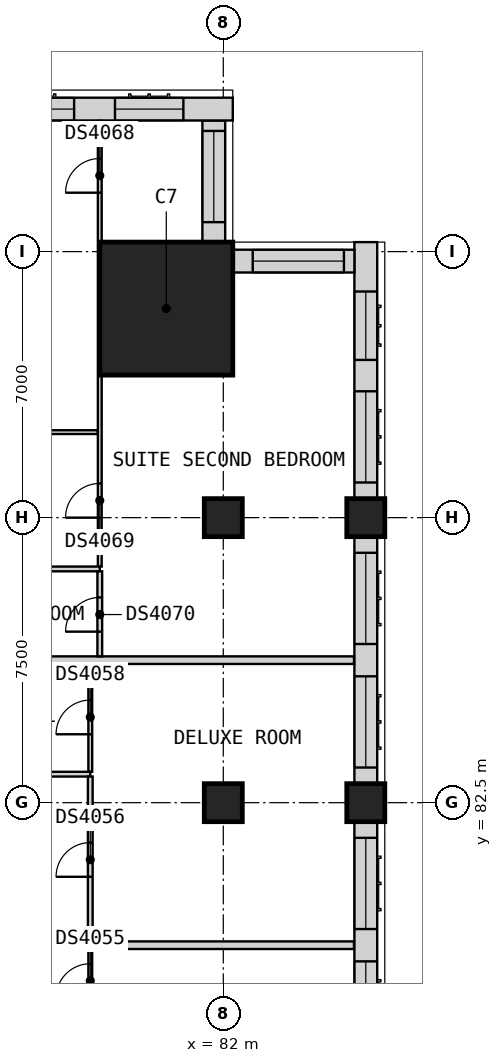
"""IFC4 building model, lengths in metres.
Left out: names, types, materials, properties, quantities, classifications, styles, units other than length and angle.
Written with IfcOpenShell. Run it as: python <this file> out.ifc"""

import sys

from ifc_helpers import new_model, si_unit, direction, frame, frame_2d, origin, origin_2d, place, context, subcontext, project, spatial, rectangle, extrude, element, fill, save


model = new_model("IFC4")
c1 = context("Model", 3, precision=1e-05, world=origin(), true_north=direction((0.0, 1.0)))
c2 = subcontext(c1, "Body", "Model", "MODEL_VIEW")
j1 = project(units=[si_unit("LENGTHUNIT", "METRE"), si_unit("PLANEANGLEUNIT", "RADIAN")], contexts=[c1])
p1 = place(None, origin())
s1 = spatial("IfcSite", under=j1, at=p1, CompositionType="ELEMENT")
p2 = place(p1, origin())
s2 = spatial("IfcBuilding", under=s1, at=p2, CompositionType="ELEMENT")
p3 = place(p2, frame((0.0, 0.0, 141.0)))
s3 = spatial("IfcBuildingStorey", under=s2, at=p3, CompositionType="ELEMENT", Elevation=141.0)
for number, where, z_axis, x_axis in (
    (1, (85.75, 82.5, 0.0), (0.0, 0.0, 1.0), (1.0, 0.0, 0.0)),
    (2, (85.75, 90.0, 0.0), (0.0, 0.0, 1.0), (1.0, 0.0, 0.0)),
    (3, (82.0, 82.5, 0.0), (0.0, 0.0, 1.0), (1.0, 0.0, 0.0)),
    (4, (82.0, 90.0, 0.0), (0.0, 0.0, 1.0), (1.0, 0.0, 0.0)),
):
    element("IfcColumn", number, at=place(p3, frame(where, z_axis=z_axis, x_axis=x_axis)), inside=s3, PredefinedType="COLUMN", context=c2, shape_type="SweptSolid", body=[
        extrude(rectangle(XDim=1.0, YDim=1.0, at=origin_2d()), origin(), (0.0, 0.0, 1.0), 3.6),
    ])
p4 = place(p3, frame((80.5, 95.5, 0.0), z_axis=(0.0, 0.0, 1.0), x_axis=(1.0, 0.0, 0.0)))
e5 = element("IfcColumn", 5, at=p4, inside=s3, PredefinedType="COLUMN", context=c2, shape_type="SweptSolid", body=[
    extrude(rectangle(XDim=3.5, YDim=3.5, at=origin_2d()), origin(), (0.0, 0.0, 1.0), 3.6),
])
p5 = place(p3, frame((85.75, 75.5, 0.0), z_axis=(0.0, 0.0, 1.0), x_axis=(0.0, 1.0, 0.0)))
e6 = element("IfcWall", 6, at=p5, inside=s3, PredefinedType="SOLIDWALL", context=c2, shape_type="SweptSolid", body=[
    extrude(rectangle(XDim=6.5, YDim=0.6, at=frame_2d((3.25, 0.0))), origin(), (0.0, 0.0, 1.0), 2.85),
])
p6 = place(p5, frame((0.425, 0.0, 0.8)))
e7 = element("IfcOpeningElement", 7, at=p6, cuts=e6, PredefinedType="OPENING", context=c2, shape_type="SweptSolid", body=[
    extrude(rectangle(XDim=2.4, YDim=1.8, at=frame_2d((1.2, 0.9))), frame((0.0, 0.31, 0.0), z_axis=(0.0, -1.0, 0.0), x_axis=(1.0, 0.0, 0.0)), (0.0, 0.0, 1.0), 0.62),
])
p7 = place(p5, frame((3.675, 0.0, 0.8)))
e8 = element("IfcOpeningElement", 8, at=p7, cuts=e6, PredefinedType="OPENING", context=c2, shape_type="SweptSolid", body=[
    extrude(rectangle(XDim=2.4, YDim=1.8, at=frame_2d((1.2, 0.9))), frame((0.0, 0.31, 0.0), z_axis=(0.0, -1.0, 0.0), x_axis=(1.0, 0.0, 0.0)), (0.0, 0.0, 1.0), 0.62),
])
p8 = place(p3, frame((85.75, 83.0, 0.0), z_axis=(0.0, 0.0, 1.0), x_axis=(0.0, 1.0, 0.0)))
e9 = element("IfcWall", 9, at=p8, inside=s3, PredefinedType="SOLIDWALL", context=c2, shape_type="SweptSolid", body=[
    extrude(rectangle(XDim=6.5, YDim=0.6, at=frame_2d((3.25, 0.0))), origin(), (0.0, 0.0, 1.0), 2.85),
])
p9 = place(p8, frame((0.425, 0.0, 0.8)))
e10 = element("IfcOpeningElement", 10, at=p9, cuts=e9, PredefinedType="OPENING", context=c2, shape_type="SweptSolid", body=[
    extrude(rectangle(XDim=2.4, YDim=1.8, at=frame_2d((1.2, 0.9))), frame((0.0, 0.31, 0.0), z_axis=(0.0, -1.0, 0.0), x_axis=(1.0, 0.0, 0.0)), (0.0, 0.0, 1.0), 0.62),
])
p10 = place(p8, frame((3.675, 0.0, 0.8)))
e11 = element("IfcOpeningElement", 11, at=p10, cuts=e9, PredefinedType="OPENING", context=c2, shape_type="SweptSolid", body=[
    extrude(rectangle(XDim=2.4, YDim=1.8, at=frame_2d((1.2, 0.9))), frame((0.0, 0.31, 0.0), z_axis=(0.0, -1.0, 0.0), x_axis=(1.0, 0.0, 0.0)), (0.0, 0.0, 1.0), 0.62),
])
p11 = place(p3, frame((85.75, 90.5, 0.0), z_axis=(0.0, 0.0, 1.0), x_axis=(0.0, 1.0, 0.0)))
e12 = element("IfcWall", 12, at=p11, inside=s3, PredefinedType="SOLIDWALL", context=c2, shape_type="SweptSolid", body=[
    extrude(rectangle(XDim=6.75, YDim=0.6, at=frame_2d((3.375, 0.0))), origin(), (0.0, 0.0, 1.0), 2.85),
])
p12 = place(p11, frame((0.425, 0.0, 0.8)))
e13 = element("IfcOpeningElement", 13, at=p12, cuts=e12, PredefinedType="OPENING", context=c2, shape_type="SweptSolid", body=[
    extrude(rectangle(XDim=2.4, YDim=1.8, at=frame_2d((1.2, 0.9))), frame((0.0, 0.31, 0.0), z_axis=(0.0, -1.0, 0.0), x_axis=(1.0, 0.0, 0.0)), (0.0, 0.0, 1.0), 0.62),
])
p13 = place(p11, frame((3.65, 0.0, 0.8)))
e14 = element("IfcOpeningElement", 14, at=p13, cuts=e12, PredefinedType="OPENING", context=c2, shape_type="SweptSolid", body=[
    extrude(rectangle(XDim=1.8, YDim=1.8, at=frame_2d((0.9, 0.9))), frame((0.0, 0.31, 0.0), z_axis=(0.0, -1.0, 0.0), x_axis=(1.0, 0.0, 0.0)), (0.0, 0.0, 1.0), 0.62),
])
p14 = place(p3, frame((85.45, 96.75, 0.0), z_axis=(0.0, 0.0, 1.0), x_axis=(-1.0, 0.0, 0.0)))
e15 = element("IfcWall", 15, at=p14, inside=s3, PredefinedType="SOLIDWALL", context=c2, shape_type="SweptSolid", body=[
    extrude(rectangle(XDim=3.2, YDim=0.6, at=frame_2d((1.6, 0.0))), origin(), (0.0, 0.0, 1.0), 3.35),
])
p15 = place(p14, frame((0.275, 0.0, 0.8)))
e16 = element("IfcOpeningElement", 16, at=p15, cuts=e15, PredefinedType="OPENING", context=c2, shape_type="SweptSolid", body=[
    extrude(rectangle(XDim=2.4, YDim=1.8, at=frame_2d((1.2, 0.9))), frame((0.0, 0.31, 0.0), z_axis=(0.0, -1.0, 0.0), x_axis=(1.0, 0.0, 0.0)), (0.0, 0.0, 1.0), 0.62),
])
p16 = place(p3, frame((81.75, 97.25, 0.0), z_axis=(0.0, 0.0, 1.0), x_axis=(0.0, 1.0, 0.0)))
e17 = element("IfcWall", 17, at=p16, inside=s3, PredefinedType="SOLIDWALL", context=c2, shape_type="SweptSolid", body=[
    extrude(rectangle(XDim=3.2, YDim=0.6, at=frame_2d((1.6, 0.0))), origin(), (0.0, 0.0, 1.0), 3.35),
])
p17 = place(p16, frame((0.525, 0.0, 0.8)))
e18 = element("IfcOpeningElement", 18, at=p17, cuts=e17, PredefinedType="OPENING", context=c2, shape_type="SweptSolid", body=[
    extrude(rectangle(XDim=2.4, YDim=1.8, at=frame_2d((1.2, 0.9))), frame((0.0, 0.31, 0.0), z_axis=(0.0, -1.0, 0.0), x_axis=(1.0, 0.0, 0.0)), (0.0, 0.0, 1.0), 0.62),
])
p18 = place(p3, frame((82.25, 100.75, 0.0), z_axis=(0.0, 0.0, 1.0), x_axis=(-1.0, 0.0, 0.0)))
e19 = element("IfcWall", 19, at=p18, inside=s3, PredefinedType="SOLIDWALL", context=c2, shape_type="SweptSolid", body=[
    extrude(rectangle(XDim=7.25, YDim=0.6, at=frame_2d((3.625, 0.0))), origin(), (0.0, 0.0, 1.0), 2.85),
])
p19 = place(p18, frame((4.175, 0.0, 0.8)))
e20 = element("IfcOpeningElement", 20, at=p19, cuts=e19, PredefinedType="OPENING", context=c2, shape_type="SweptSolid", body=[
    extrude(rectangle(XDim=2.4, YDim=1.8, at=frame_2d((1.2, 0.9))), frame((0.0, 0.31, 0.0), z_axis=(0.0, -1.0, 0.0), x_axis=(1.0, 0.0, 0.0)), (0.0, 0.0, 1.0), 0.62),
])
p20 = place(p18, frame((1.3, 0.0, 0.8)))
e21 = element("IfcOpeningElement", 21, at=p20, cuts=e19, PredefinedType="OPENING", context=c2, shape_type="SweptSolid", body=[
    extrude(rectangle(XDim=1.8, YDim=1.8, at=frame_2d((0.9, 0.9))), frame((0.0, 0.31, 0.0), z_axis=(0.0, -1.0, 0.0), x_axis=(1.0, 0.0, 0.0)), (0.0, 0.0, 1.0), 0.62),
])
for number, where, z_axis, x_axis in (
    (22, (73.725, 78.75, 0.0), (0.0, 0.0, 1.0), (1.0, 0.0, 0.0)),
    (23, (73.725, 86.25, 0.0), (0.0, 0.0, 1.0), (1.0, 0.0, 0.0)),
):
    element("IfcWall", number, at=place(p3, frame(where, z_axis=z_axis, x_axis=x_axis)), inside=s3, PredefinedType="PARTITIONING", context=c2, shape_type="SweptSolid", body=[
        extrude(rectangle(XDim=11.715, YDim=0.2, at=frame_2d((5.857, 0.0))), origin(), (0.0, 0.0, 1.0), 3.35),
    ])
p21 = place(p3, frame((71.35, 92.25, 0.0), z_axis=(0.0, 0.0, 1.0), x_axis=(1.0, 0.0, 0.0)))
e24 = element("IfcWall", 24, at=p21, inside=s3, PredefinedType="PARTITIONING", context=c2, shape_type="SweptSolid", body=[
    extrude(rectangle(XDim=7.35, YDim=0.1, at=frame_2d((3.675, 0.0))), origin(), (0.0, 0.0, 1.0), 3.35),
])
p22 = place(p21, frame((0.65, 0.0, 0.0)))
e25 = element("IfcOpeningElement", 25, at=p22, cuts=e24, PredefinedType="OPENING", context=c2, shape_type="SweptSolid", body=[
    extrude(rectangle(XDim=0.9, YDim=2.1, at=frame_2d((0.45, 1.05))), frame((0.0, 0.06, 0.0), z_axis=(0.0, -1.0, 0.0), x_axis=(1.0, 0.0, 0.0)), (0.0, 0.0, 1.0), 0.12),
])
p23 = place(p3, frame((78.8, 96.75, 0.0), z_axis=(0.0, 0.0, 1.0), x_axis=(1.0, 0.0, 0.0)))
e26 = element("IfcWall", 26, at=p23, inside=s3, PredefinedType="PARTITIONING", context=c2, shape_type="SweptSolid", body=[
    extrude(rectangle(XDim=3.44, YDim=0.1, at=frame_2d((1.72, 0.0))), origin(), (0.0, 0.0, 1.0), 3.35),
])
p24 = place(p3, frame((78.5, 76.938, 0.0), z_axis=(0.0, 0.0, 1.0), x_axis=(0.0, 1.0, 0.0)))
e27 = element("IfcWall", 27, at=p24, inside=s3, PredefinedType="PARTITIONING", context=c2, shape_type="SweptSolid", body=[
    extrude(rectangle(XDim=1.712, YDim=0.1, at=frame_2d((0.856, 0.0))), origin(), (0.0, 0.0, 1.0), 3.35),
])
p25 = place(p24, frame((0.425, 0.0, 0.0)))
e28 = element("IfcOpeningElement", 28, at=p25, cuts=e27, PredefinedType="OPENING", context=c2, shape_type="SweptSolid", body=[
    extrude(rectangle(XDim=0.9, YDim=2.1, at=frame_2d((0.45, 1.05))), frame((0.0, 0.06, 0.0), z_axis=(0.0, -1.0, 0.0), x_axis=(1.0, 0.0, 0.0)), (0.0, 0.0, 1.0), 0.12),
])
p26 = place(p3, frame((78.5, 83.312, 0.0), z_axis=(0.0, 0.0, 1.0), x_axis=(0.0, 1.0, 0.0)))
e29 = element("IfcWall", 29, at=p26, inside=s3, PredefinedType="PARTITIONING", context=c2, shape_type="SweptSolid", body=[
    extrude(rectangle(XDim=2.837, YDim=0.1, at=frame_2d((1.419, 0.0))), origin(), (0.0, 0.0, 1.0), 3.35),
])
p27 = place(p26, frame((0.988, 0.0, 0.0)))
e30 = element("IfcOpeningElement", 30, at=p27, cuts=e29, PredefinedType="OPENING", context=c2, shape_type="SweptSolid", body=[
    extrude(rectangle(XDim=0.9, YDim=2.1, at=frame_2d((0.45, 1.05))), frame((0.0, 0.06, 0.0), z_axis=(0.0, -1.0, 0.0), x_axis=(1.0, 0.0, 0.0)), (0.0, 0.0, 1.0), 0.12),
])
p28 = place(p3, frame((78.75, 88.712, 0.0), z_axis=(0.0, 0.0, 1.0), x_axis=(0.0, 1.0, 0.0)))
e31 = element("IfcWall", 31, at=p28, inside=s3, PredefinedType="PARTITIONING", context=c2, shape_type="SweptSolid", body=[
    extrude(rectangle(XDim=11.728, YDim=0.1, at=frame_2d((5.864, 0.0))), origin(), (0.0, 0.0, 1.0), 3.35),
])
p29 = place(p28, frame((9.837, 0.0, 0.0)))
e32 = element("IfcOpeningElement", 32, at=p29, cuts=e31, PredefinedType="OPENING", context=c2, shape_type="SweptSolid", body=[
    extrude(rectangle(XDim=0.9, YDim=2.1, at=frame_2d((0.45, 1.05))), frame((0.0, 0.06, 0.0), z_axis=(0.0, -1.0, 0.0), x_axis=(1.0, 0.0, 0.0)), (0.0, 0.0, 1.0), 0.12),
])
p30 = place(p28, frame((1.288, 0.0, 0.0)))
e33 = element("IfcOpeningElement", 33, at=p30, cuts=e31, PredefinedType="OPENING", context=c2, shape_type="SweptSolid", body=[
    extrude(rectangle(XDim=0.9, YDim=2.1, at=frame_2d((0.45, 1.05))), frame((0.0, 0.06, 0.0), z_axis=(0.0, -1.0, 0.0), x_axis=(1.0, 0.0, 0.0)), (0.0, 0.0, 1.0), 0.12),
])
p31 = place(p3, frame((73.725, 83.25, 0.0), z_axis=(0.0, 0.0, 1.0), x_axis=(1.0, 0.0, 0.0)))
e34 = element("IfcWall", 34, at=p31, inside=s3, PredefinedType="PARTITIONING", context=c2, shape_type="SweptSolid", body=[
    extrude(rectangle(XDim=4.775, YDim=0.125, at=frame_2d((2.387, 0.0))), origin(), (0.0, 0.0, 1.0), 3.35),
])
p32 = place(p3, frame((73.725, 88.65, 0.0), z_axis=(0.0, 0.0, 1.0), x_axis=(1.0, 0.0, 0.0)))
e35 = element("IfcWall", 35, at=p32, inside=s3, PredefinedType="PARTITIONING", context=c2, shape_type="SweptSolid", body=[
    extrude(rectangle(XDim=5.025, YDim=0.125, at=frame_2d((2.512, 0.0))), origin(), (0.0, 0.0, 1.0), 3.35),
])
p33 = place(p3, frame((78.5, 78.85, 0.0), z_axis=(0.0, 0.0, 1.0), x_axis=(0.0, 1.0, 0.0)))
e36 = element("IfcWall", 36, at=p33, inside=s3, PredefinedType="PARTITIONING", context=c2, shape_type="SweptSolid", body=[
    extrude(rectangle(XDim=4.337, YDim=0.125, at=frame_2d((2.169, 0.0))), origin(), (0.0, 0.0, 1.0), 3.35),
])
p34 = place(p33, frame((1.7, 0.0, 0.0)))
e37 = element("IfcOpeningElement", 37, at=p34, cuts=e36, PredefinedType="OPENING", context=c2, shape_type="SweptSolid", body=[
    extrude(rectangle(XDim=0.9, YDim=2.1, at=frame_2d((0.45, 1.05))), frame((0.0, 0.073, 0.0), z_axis=(0.0, -1.0, 0.0), x_axis=(1.0, 0.0, 0.0)), (0.0, 0.0, 1.0), 0.145),
])
p35 = place(p3, frame((78.75, 86.35, 0.0), z_axis=(0.0, 0.0, 1.0), x_axis=(0.0, 1.0, 0.0)))
e38 = element("IfcWall", 38, at=p35, inside=s3, PredefinedType="PARTITIONING", context=c2, shape_type="SweptSolid", body=[
    extrude(rectangle(XDim=2.237, YDim=0.125, at=frame_2d((1.119, 0.0))), origin(), (0.0, 0.0, 1.0), 3.35),
])
p36 = place(p35, frame((0.65, 0.0, 0.0)))
e39 = element("IfcOpeningElement", 39, at=p36, cuts=e38, PredefinedType="OPENING", context=c2, shape_type="SweptSolid", body=[
    extrude(rectangle(XDim=0.9, YDim=2.1, at=frame_2d((0.45, 1.05))), frame((0.0, 0.073, 0.0), z_axis=(0.0, -1.0, 0.0), x_axis=(1.0, 0.0, 0.0)), (0.0, 0.0, 1.0), 0.145),
])
p37 = place(p6, origin())
e40 = element("IfcWindow", 40, at=p37, inside=s3, PartitioningType="SINGLE_PANEL", PredefinedType="WINDOW", context=c2, shape_type="SweptSolid", body=[
    extrude(rectangle(XDim=2.4, YDim=1.8, at=frame_2d((1.2, 0.9))), frame((0.0, -0.07, 0.0), z_axis=(0.0, -1.0, 0.0), x_axis=(1.0, 0.0, 0.0)), (0.0, 0.0, 1.0), 0.06),
])
fill(e7, e40)
p38 = place(p7, origin())
e41 = element("IfcWindow", 41, at=p38, inside=s3, PartitioningType="SINGLE_PANEL", PredefinedType="WINDOW", context=c2, shape_type="SweptSolid", body=[
    extrude(rectangle(XDim=2.4, YDim=1.8, at=frame_2d((1.2, 0.9))), frame((0.0, -0.07, 0.0), z_axis=(0.0, -1.0, 0.0), x_axis=(1.0, 0.0, 0.0)), (0.0, 0.0, 1.0), 0.06),
])
fill(e8, e41)
p39 = place(p9, origin())
e42 = element("IfcWindow", 42, at=p39, inside=s3, PartitioningType="SINGLE_PANEL", PredefinedType="WINDOW", context=c2, shape_type="SweptSolid", body=[
    extrude(rectangle(XDim=2.4, YDim=1.8, at=frame_2d((1.2, 0.9))), frame((0.0, -0.07, 0.0), z_axis=(0.0, -1.0, 0.0), x_axis=(1.0, 0.0, 0.0)), (0.0, 0.0, 1.0), 0.06),
])
fill(e10, e42)
p40 = place(p10, origin())
e43 = element("IfcWindow", 43, at=p40, inside=s3, PartitioningType="SINGLE_PANEL", PredefinedType="WINDOW", context=c2, shape_type="SweptSolid", body=[
    extrude(rectangle(XDim=2.4, YDim=1.8, at=frame_2d((1.2, 0.9))), frame((0.0, -0.07, 0.0), z_axis=(0.0, -1.0, 0.0), x_axis=(1.0, 0.0, 0.0)), (0.0, 0.0, 1.0), 0.06),
])
fill(e11, e43)
p41 = place(p12, origin())
e44 = element("IfcWindow", 44, at=p41, inside=s3, PartitioningType="SINGLE_PANEL", PredefinedType="WINDOW", context=c2, shape_type="SweptSolid", body=[
    extrude(rectangle(XDim=2.4, YDim=1.8, at=frame_2d((1.2, 0.9))), frame((0.0, -0.07, 0.0), z_axis=(0.0, -1.0, 0.0), x_axis=(1.0, 0.0, 0.0)), (0.0, 0.0, 1.0), 0.06),
])
fill(e13, e44)
p42 = place(p13, origin())
e45 = element("IfcWindow", 45, at=p42, inside=s3, PartitioningType="SINGLE_PANEL", PredefinedType="WINDOW", context=c2, shape_type="SweptSolid", body=[
    extrude(rectangle(XDim=1.8, YDim=1.8, at=frame_2d((0.9, 0.9))), frame((0.0, -0.07, 0.0), z_axis=(0.0, -1.0, 0.0), x_axis=(1.0, 0.0, 0.0)), (0.0, 0.0, 1.0), 0.06),
])
fill(e14, e45)
p43 = place(p15, origin())
e46 = element("IfcWindow", 46, at=p43, inside=s3, PartitioningType="SINGLE_PANEL", PredefinedType="WINDOW", context=c2, shape_type="SweptSolid", body=[
    extrude(rectangle(XDim=2.4, YDim=1.8, at=frame_2d((1.2, 0.9))), frame((0.0, -0.07, 0.0), z_axis=(0.0, -1.0, 0.0), x_axis=(1.0, 0.0, 0.0)), (0.0, 0.0, 1.0), 0.06),
])
fill(e16, e46)
p44 = place(p17, origin())
e47 = element("IfcWindow", 47, at=p44, inside=s3, PartitioningType="SINGLE_PANEL", PredefinedType="WINDOW", context=c2, shape_type="SweptSolid", body=[
    extrude(rectangle(XDim=2.4, YDim=1.8, at=frame_2d((1.2, 0.9))), frame((0.0, -0.07, 0.0), z_axis=(0.0, -1.0, 0.0), x_axis=(1.0, 0.0, 0.0)), (0.0, 0.0, 1.0), 0.06),
])
fill(e18, e47)
p45 = place(p19, origin())
e48 = element("IfcWindow", 48, at=p45, inside=s3, PartitioningType="SINGLE_PANEL", PredefinedType="WINDOW", context=c2, shape_type="SweptSolid", body=[
    extrude(rectangle(XDim=2.4, YDim=1.8, at=frame_2d((1.2, 0.9))), frame((0.0, -0.07, 0.0), z_axis=(0.0, -1.0, 0.0), x_axis=(1.0, 0.0, 0.0)), (0.0, 0.0, 1.0), 0.06),
])
fill(e20, e48)
p46 = place(p20, origin())
e49 = element("IfcWindow", 49, at=p46, inside=s3, PartitioningType="SINGLE_PANEL", PredefinedType="WINDOW", context=c2, shape_type="SweptSolid", body=[
    extrude(rectangle(XDim=1.8, YDim=1.8, at=frame_2d((0.9, 0.9))), frame((0.0, -0.07, 0.0), z_axis=(0.0, -1.0, 0.0), x_axis=(1.0, 0.0, 0.0)), (0.0, 0.0, 1.0), 0.06),
])
fill(e21, e49)
p47 = place(p25, origin())
e50 = element("IfcDoor", 50, at=p47, inside=s3, OperationType="SINGLE_SWING_LEFT", PredefinedType="DOOR", context=c2, shape_type="SweptSolid", body=[
    extrude(rectangle(XDim=0.9, YDim=2.1, at=frame_2d((0.45, 1.05))), frame((0.0, 0.025, 0.0), z_axis=(0.0, -1.0, 0.0), x_axis=(1.0, 0.0, 0.0)), (0.0, 0.0, 1.0), 0.05),
])
fill(e28, e50)
p48 = place(p34, origin())
e51 = element("IfcDoor", 51, at=p48, inside=s3, OperationType="SINGLE_SWING_LEFT", PredefinedType="DOOR", context=c2, shape_type="SweptSolid", body=[
    extrude(rectangle(XDim=0.9, YDim=2.1, at=frame_2d((0.45, 1.05))), frame((0.0, 0.025, 0.0), z_axis=(0.0, -1.0, 0.0), x_axis=(1.0, 0.0, 0.0)), (0.0, 0.0, 1.0), 0.05),
])
fill(e37, e51)
p49 = place(p27, origin())
e52 = element("IfcDoor", 52, at=p49, inside=s3, OperationType="SINGLE_SWING_LEFT", PredefinedType="DOOR", context=c2, shape_type="SweptSolid", body=[
    extrude(rectangle(XDim=0.9, YDim=2.1, at=frame_2d((0.45, 1.05))), frame((0.0, 0.025, 0.0), z_axis=(0.0, -1.0, 0.0), x_axis=(1.0, 0.0, 0.0)), (0.0, 0.0, 1.0), 0.05),
])
fill(e30, e52)
p50 = place(p29, origin())
e53 = element("IfcDoor", 53, at=p50, inside=s3, OperationType="SINGLE_SWING_LEFT", PredefinedType="DOOR", context=c2, shape_type="SweptSolid", body=[
    extrude(rectangle(XDim=0.9, YDim=2.1, at=frame_2d((0.45, 1.05))), frame((0.0, 0.025, 0.0), z_axis=(0.0, -1.0, 0.0), x_axis=(1.0, 0.0, 0.0)), (0.0, 0.0, 1.0), 0.05),
])
fill(e32, e53)
p51 = place(p30, origin())
e54 = element("IfcDoor", 54, at=p51, inside=s3, OperationType="SINGLE_SWING_RIGHT", PredefinedType="DOOR", context=c2, shape_type="SweptSolid", body=[
    extrude(rectangle(XDim=0.9, YDim=2.1, at=frame_2d((0.45, 1.05))), frame((0.0, 0.025, 0.0), z_axis=(0.0, -1.0, 0.0), x_axis=(1.0, 0.0, 0.0)), (0.0, 0.0, 1.0), 0.05),
])
fill(e33, e54)
p52 = place(p36, origin())
e55 = element("IfcDoor", 55, at=p52, inside=s3, OperationType="SINGLE_SWING_LEFT", PredefinedType="DOOR", context=c2, shape_type="SweptSolid", body=[
    extrude(rectangle(XDim=0.9, YDim=2.1, at=frame_2d((0.45, 1.05))), frame((0.0, 0.025, 0.0), z_axis=(0.0, -1.0, 0.0), x_axis=(1.0, 0.0, 0.0)), (0.0, 0.0, 1.0), 0.05),
])
fill(e39, e55)
save(model, sys.argv[1])
